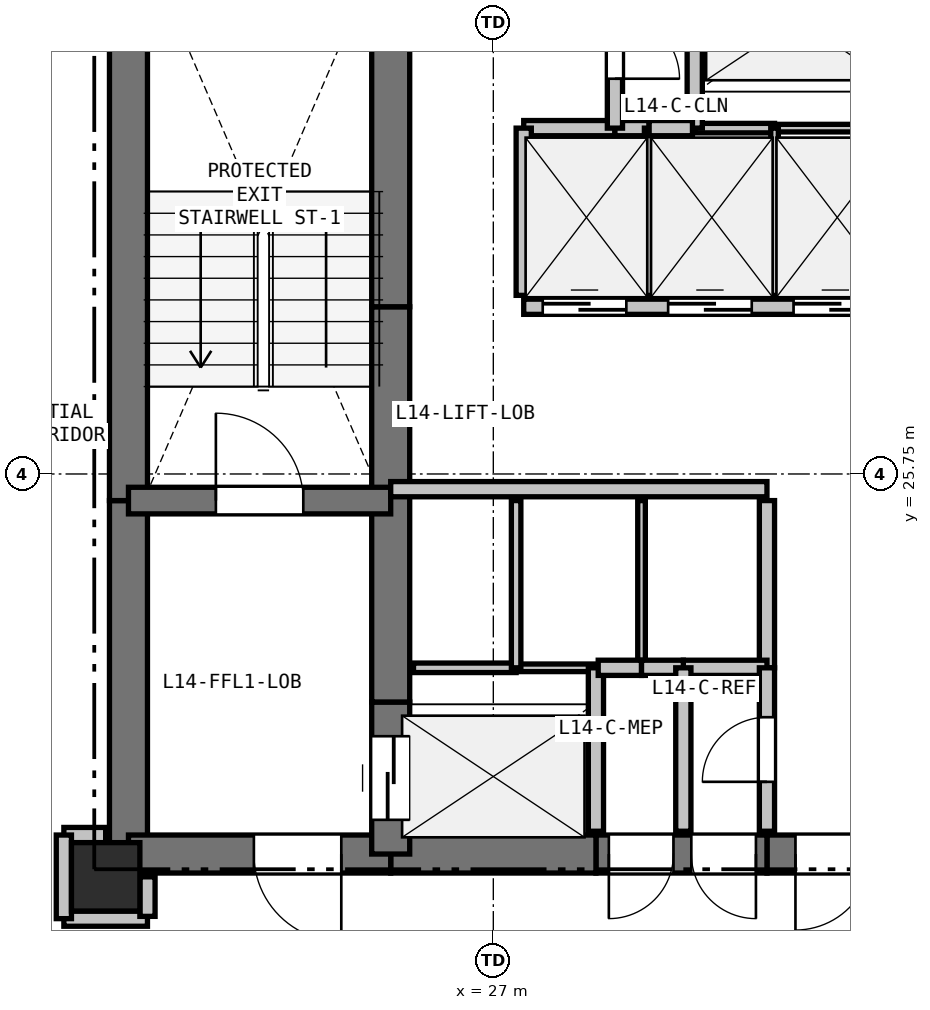
"""IFC4 building model, lengths in metres.
Left out: names, types, materials, properties, quantities, classifications, styles, units other than length and angle.
Written with IfcOpenShell. Run it as: python <this file> out.ifc"""

import sys

from ifc_helpers import new_model, si_unit, direction, frame, frame_2d, origin, origin_2d, place, context, subcontext, project, spatial, rectangle, extrude, element, fill, save


model = new_model("IFC4")
c1 = context("Model", 3, precision=1e-05, world=origin(), true_north=direction((0.0, 1.0)))
c2 = subcontext(c1, "Body", "Model", "MODEL_VIEW")
j1 = project(units=[si_unit("LENGTHUNIT", "METRE"), si_unit("PLANEANGLEUNIT", "RADIAN")], contexts=[c1])
p1 = place(None, origin())
s1 = spatial("IfcSite", under=j1, at=p1, CompositionType="ELEMENT")
p2 = place(p1, origin())
s2 = spatial("IfcBuilding", under=s1, at=p2, CompositionType="ELEMENT")
p3 = place(p2, frame((0.0, 0.0, 52.2)))
s3 = spatial("IfcBuildingStorey", under=s2, at=p3, CompositionType="ELEMENT", Elevation=52.2)
p4 = place(p3, frame((21.9, 20.45, 0.0), z_axis=(0.0, 0.0, 1.0), x_axis=(1.0, 0.0, 0.0)))
e1 = element("IfcColumn", 1, at=p4, inside=s3, PredefinedType="COLUMN", context=c2, shape_type="SweptSolid", body=[
    extrude(rectangle(XDim=0.9, YDim=0.9, at=origin_2d()), origin(), (0.0, 0.0, 1.0), 3.3),
])
p5 = place(p3, frame((22.2, 20.75, 0.0), z_axis=(0.0, 0.0, 1.0), x_axis=(0.0, 1.0, 0.0)))
e2 = element("IfcWall", 2, at=p5, inside=s3, PredefinedType="SHEAR", context=c2, shape_type="SweptSolid", body=[
    extrude(rectangle(XDim=4.65, YDim=0.5, at=frame_2d((2.325, 0.0))), origin(), (0.0, 0.0, 1.0), 3.04),
])
p6 = place(p3, frame((22.2, 25.4, 0.0), z_axis=(0.0, 0.0, 1.0), x_axis=(0.0, 1.0, 0.0)))
e3 = element("IfcWall", 3, at=p6, inside=s3, PredefinedType="SHEAR", context=c2, shape_type="SweptSolid", body=[
    extrude(rectangle(XDim=7.35, YDim=0.5, at=frame_2d((3.675, 0.0))), origin(), (0.0, 0.0, 1.0), 3.04),
])
p7 = place(p3, frame((32.35, 20.75, 0.0), z_axis=(0.0, 0.0, 1.0), x_axis=(-1.0, 0.0, 0.0)))
e4 = element("IfcWall", 4, at=p7, inside=s3, PredefinedType="SHEAR", context=c2, shape_type="SweptSolid", body=[
    extrude(rectangle(XDim=1.75, YDim=0.5, at=frame_2d((0.875, 0.0))), origin(), (0.0, 0.0, 1.0), 3.04),
])
p8 = place(p7, frame((0.375, 0.0, 0.0)))
e5 = element("IfcOpeningElement", 5, at=p8, cuts=e4, PredefinedType="OPENING", context=c2, shape_type="SweptSolid", body=[
    extrude(rectangle(XDim=1.0, YDim=2.15, at=frame_2d((0.5, 1.075))), frame((0.0, 0.26, 0.0), z_axis=(0.0, -1.0, 0.0), x_axis=(1.0, 0.0, 0.0)), (0.0, 0.0, 1.0), 0.52),
])
p9 = place(p3, frame((30.6, 20.75, 0.0), z_axis=(0.0, 0.0, 1.0), x_axis=(-1.0, 0.0, 0.0)))
e6 = element("IfcWall", 6, at=p9, inside=s3, PredefinedType="SHEAR", context=c2, shape_type="SweptSolid", body=[
    extrude(rectangle(XDim=2.25, YDim=0.5, at=frame_2d((1.125, 0.0))), origin(), (0.0, 0.0, 1.0), 3.04),
])
p10 = place(p9, frame((1.23, 0.0, 0.0)))
e7 = element("IfcOpeningElement", 7, at=p10, cuts=e6, PredefinedType="OPENING", context=c2, shape_type="SweptSolid", body=[
    extrude(rectangle(XDim=0.85, YDim=2.1, at=frame_2d((0.425, 1.05))), frame((0.0, 0.26, 0.0), z_axis=(0.0, -1.0, 0.0), x_axis=(1.0, 0.0, 0.0)), (0.0, 0.0, 1.0), 0.52),
])
p11 = place(p9, frame((0.145, 0.0, 0.0)))
e8 = element("IfcOpeningElement", 8, at=p11, cuts=e6, PredefinedType="OPENING", context=c2, shape_type="SweptSolid", body=[
    extrude(rectangle(XDim=0.85, YDim=2.1, at=frame_2d((0.425, 1.05))), frame((0.0, 0.26, 0.0), z_axis=(0.0, -1.0, 0.0), x_axis=(1.0, 0.0, 0.0)), (0.0, 0.0, 1.0), 0.52),
])
p12 = place(p3, frame((28.35, 20.75, 0.0), z_axis=(0.0, 0.0, 1.0), x_axis=(-1.0, 0.0, 0.0)))
e9 = element("IfcWall", 9, at=p12, inside=s3, PredefinedType="SHEAR", context=c2, shape_type="SweptSolid", body=[
    extrude(rectangle(XDim=2.7, YDim=0.5, at=frame_2d((1.35, 0.0))), origin(), (0.0, 0.0, 1.0), 3.04),
])
p13 = place(p3, frame((25.65, 20.75, 0.0), z_axis=(0.0, 0.0, 1.0), x_axis=(-1.0, 0.0, 0.0)))
e10 = element("IfcWall", 10, at=p13, inside=s3, PredefinedType="SHEAR", context=c2, shape_type="SweptSolid", body=[
    extrude(rectangle(XDim=3.45, YDim=0.5, at=frame_2d((1.725, 0.0))), origin(), (0.0, 0.0, 1.0), 3.04),
])
p14 = place(p13, frame((0.65, 0.0, 0.0)))
e11 = element("IfcOpeningElement", 11, at=p14, cuts=e10, PredefinedType="OPENING", context=c2, shape_type="SweptSolid", body=[
    extrude(rectangle(XDim=1.15, YDim=2.15, at=frame_2d((0.575, 1.075))), frame((0.0, 0.26, 0.0), z_axis=(0.0, -1.0, 0.0), x_axis=(1.0, 0.0, 0.0)), (0.0, 0.0, 1.0), 0.52),
])
p15 = place(p3, frame((25.65, 20.75, 0.0), z_axis=(0.0, 0.0, 1.0), x_axis=(0.0, 1.0, 0.0)))
e12 = element("IfcWall", 12, at=p15, inside=s3, PredefinedType="SHEAR", context=c2, shape_type="SweptSolid", body=[
    extrude(rectangle(XDim=2.0, YDim=0.5, at=frame_2d((1.0, 0.0))), origin(), (0.0, 0.0, 1.0), 3.04),
])
p16 = place(p15, frame((0.45, 0.0, 0.0)))
e13 = element("IfcOpeningElement", 13, at=p16, cuts=e12, PredefinedType="OPENING", context=c2, shape_type="SweptSolid", body=[
    extrude(rectangle(XDim=1.1, YDim=2.15, at=frame_2d((0.55, 1.075))), frame((0.0, 0.26, 0.0), z_axis=(0.0, -1.0, 0.0), x_axis=(1.0, 0.0, 0.0)), (0.0, 0.0, 1.0), 0.52),
])
p17 = place(p3, frame((25.65, 22.75, 0.0), z_axis=(0.0, 0.0, 1.0), x_axis=(0.0, 1.0, 0.0)))
e14 = element("IfcWall", 14, at=p17, inside=s3, PredefinedType="SHEAR", context=c2, shape_type="SweptSolid", body=[
    extrude(rectangle(XDim=2.8, YDim=0.5, at=frame_2d((1.4, 0.0))), origin(), (0.0, 0.0, 1.0), 3.04),
])
p18 = place(p3, frame((25.65, 25.55, 0.0), z_axis=(0.0, 0.0, 1.0), x_axis=(0.0, 1.0, 0.0)))
e15 = element("IfcWall", 15, at=p18, inside=s3, PredefinedType="SHEAR", context=c2, shape_type="SweptSolid", body=[
    extrude(rectangle(XDim=2.4, YDim=0.5, at=frame_2d((1.2, 0.0))), origin(), (0.0, 0.0, 1.0), 3.04),
])
p19 = place(p3, frame((25.65, 27.95, 0.0), z_axis=(0.0, 0.0, 1.0), x_axis=(0.0, 1.0, 0.0)))
e16 = element("IfcWall", 16, at=p19, inside=s3, PredefinedType="SHEAR", context=c2, shape_type="SweptSolid", body=[
    extrude(rectangle(XDim=4.8, YDim=0.5, at=frame_2d((2.4, 0.0))), origin(), (0.0, 0.0, 1.0), 3.04),
])
p20 = place(p3, frame((22.2, 25.4, 0.0), z_axis=(0.0, 0.0, 1.0), x_axis=(1.0, 0.0, 0.0)))
e17 = element("IfcWall", 17, at=p20, inside=s3, PredefinedType="SHEAR", context=c2, shape_type="SweptSolid", body=[
    extrude(rectangle(XDim=3.45, YDim=0.35, at=frame_2d((1.725, 0.0))), origin(), (0.0, 0.0, 1.0), 3.04),
])
p21 = place(p20, frame((1.15, 0.0, 0.0)))
e18 = element("IfcOpeningElement", 18, at=p21, cuts=e17, PredefinedType="OPENING", context=c2, shape_type="SweptSolid", body=[
    extrude(rectangle(XDim=1.15, YDim=2.15, at=frame_2d((0.575, 1.075))), frame((0.0, 0.185, 0.0), z_axis=(0.0, -1.0, 0.0), x_axis=(1.0, 0.0, 0.0)), (0.0, 0.0, 1.0), 0.37),
])
p22 = place(p3, frame((25.65, 25.55, 0.0), z_axis=(0.0, 0.0, 1.0), x_axis=(1.0, 0.0, 0.0)))
e19 = element("IfcWall", 19, at=p22, inside=s3, PredefinedType="PARTITIONING", context=c2, shape_type="SweptSolid", body=[
    extrude(rectangle(XDim=4.95, YDim=0.2, at=frame_2d((2.475, 0.0))), origin(), (0.0, 0.0, 1.0), 3.04),
])
p23 = place(p3, frame((27.4, 27.95, 0.0), z_axis=(0.0, 0.0, 1.0), x_axis=(1.0, 0.0, 0.0)))
e20 = element("IfcWall", 20, at=p23, inside=s3, PredefinedType="PARTITIONING", context=c2, shape_type="SweptSolid", body=[
    extrude(rectangle(XDim=4.95, YDim=0.2, at=frame_2d((2.475, 0.0))), origin(), (0.0, 0.0, 1.0), 3.04),
])
p24 = place(p23, frame((0.25, 0.0, 0.0)))
e21 = element("IfcOpeningElement", 21, at=p24, cuts=e20, PredefinedType="OPENING", context=c2, shape_type="SweptSolid", body=[
    extrude(rectangle(XDim=1.1, YDim=2.15, at=frame_2d((0.55, 1.075))), frame((0.0, 0.11, 0.0), z_axis=(0.0, -1.0, 0.0), x_axis=(1.0, 0.0, 0.0)), (0.0, 0.0, 1.0), 0.22),
])
p25 = place(p23, frame((1.9, 0.0, 0.0)))
e22 = element("IfcOpeningElement", 22, at=p25, cuts=e20, PredefinedType="OPENING", context=c2, shape_type="SweptSolid", body=[
    extrude(rectangle(XDim=1.1, YDim=2.15, at=frame_2d((0.55, 1.075))), frame((0.0, 0.11, 0.0), z_axis=(0.0, -1.0, 0.0), x_axis=(1.0, 0.0, 0.0)), (0.0, 0.0, 1.0), 0.22),
])
p26 = place(p23, frame((3.55, 0.0, 0.0)))
e23 = element("IfcOpeningElement", 23, at=p26, cuts=e20, PredefinedType="OPENING", context=c2, shape_type="SweptSolid", body=[
    extrude(rectangle(XDim=1.1, YDim=2.15, at=frame_2d((0.55, 1.075))), frame((0.0, 0.11, 0.0), z_axis=(0.0, -1.0, 0.0), x_axis=(1.0, 0.0, 0.0)), (0.0, 0.0, 1.0), 0.22),
])
p27 = place(p3, frame((25.95, 23.2, 0.0), z_axis=(0.0, 0.0, 1.0), x_axis=(1.0, 0.0, 0.0)))
e24 = element("IfcWall", 24, at=p27, inside=s3, PredefinedType="PARTITIONING", context=c2, shape_type="SweptSolid", body=[
    extrude(rectangle(XDim=1.35, YDim=0.125, at=frame_2d((0.675, 0.0))), origin(), (0.0, 0.0, 1.0), 3.04),
])
p28 = place(p3, frame((27.3, 23.2, 0.0), z_axis=(0.0, 0.0, 1.0), x_axis=(1.0, 0.0, 0.0)))
e25 = element("IfcWall", 25, at=p28, inside=s3, PredefinedType="PARTITIONING", context=c2, shape_type="SweptSolid", body=[
    extrude(rectangle(XDim=1.05, YDim=0.1, at=frame_2d((0.525, 0.0))), origin(), (0.0, 0.0, 1.0), 3.04),
])
p29 = place(p3, frame((28.35, 23.2, 0.0), z_axis=(0.0, 0.0, 1.0), x_axis=(0.0, -1.0, 0.0)))
e26 = element("IfcWall", 26, at=p29, inside=s3, PredefinedType="PARTITIONING", context=c2, shape_type="SweptSolid", body=[
    extrude(rectangle(XDim=2.15, YDim=0.2, at=frame_2d((1.075, 0.0))), origin(), (0.0, 0.0, 1.0), 3.04),
])
p30 = place(p3, frame((32.05, 30.3, 0.0), z_axis=(0.0, 0.0, 1.0), x_axis=(-1.0, 0.0, 0.0)))
e27 = element("IfcWall", 27, at=p30, inside=s3, PredefinedType="PARTITIONING", context=c2, shape_type="SweptSolid", body=[
    extrude(rectangle(XDim=1.35, YDim=0.1, at=frame_2d((0.675, 0.0))), origin(), (0.0, 0.0, 1.0), 3.04),
])
p31 = place(p3, frame((30.7, 30.3, 0.0), z_axis=(0.0, 0.0, 1.0), x_axis=(-1.0, 0.0, 0.0)))
e28 = element("IfcWall", 28, at=p31, inside=s3, PredefinedType="PARTITIONING", context=c2, shape_type="SweptSolid", body=[
    extrude(rectangle(XDim=1.05, YDim=0.125, at=frame_2d((0.525, 0.0))), origin(), (0.0, 0.0, 1.0), 3.04),
])
p32 = place(p3, frame((29.65, 30.3, 0.0), z_axis=(0.0, 0.0, 1.0), x_axis=(0.0, 1.0, 0.0)))
e29 = element("IfcWall", 29, at=p32, inside=s3, PredefinedType="PARTITIONING", context=c2, shape_type="SweptSolid", body=[
    extrude(rectangle(XDim=2.15, YDim=0.2, at=frame_2d((1.075, 0.0))), origin(), (0.0, 0.0, 1.0), 3.04),
])
p33 = place(p3, frame((27.3, 25.4, 0.0), z_axis=(0.0, 0.0, 1.0), x_axis=(0.0, -1.0, 0.0)))
e30 = element("IfcWall", 30, at=p33, inside=s3, PredefinedType="PARTITIONING", context=c2, shape_type="SweptSolid", body=[
    extrude(rectangle(XDim=2.2, YDim=0.125, at=frame_2d((1.1, 0.0))), origin(), (0.0, 0.0, 1.0), 3.04),
])
p34 = place(p3, frame((28.95, 25.4, 0.0), z_axis=(0.0, 0.0, 1.0), x_axis=(0.0, -1.0, 0.0)))
e31 = element("IfcWall", 31, at=p34, inside=s3, PredefinedType="PARTITIONING", context=c2, shape_type="SweptSolid", body=[
    extrude(rectangle(XDim=2.2, YDim=0.1, at=frame_2d((1.1, 0.0))), origin(), (0.0, 0.0, 1.0), 3.04),
])
p35 = place(p3, frame((28.95, 23.2, 0.0), z_axis=(0.0, 0.0, 1.0), x_axis=(-1.0, 0.0, 0.0)))
e32 = element("IfcWall", 32, at=p35, inside=s3, PredefinedType="PARTITIONING", context=c2, shape_type="SweptSolid", body=[
    extrude(rectangle(XDim=0.57, YDim=0.2, at=frame_2d((0.285, 0.0))), origin(), (0.0, 0.0, 1.0), 3.04),
])
p36 = place(p3, frame((30.6, 25.4, 0.0), z_axis=(0.0, 0.0, 1.0), x_axis=(0.0, -1.0, 0.0)))
e33 = element("IfcWall", 33, at=p36, inside=s3, PredefinedType="PARTITIONING", context=c2, shape_type="SweptSolid", body=[
    extrude(rectangle(XDim=2.2, YDim=0.2, at=frame_2d((1.1, 0.0))), origin(), (0.0, 0.0, 1.0), 3.04),
])
p37 = place(p3, frame((30.6, 23.2, 0.0), z_axis=(0.0, 0.0, 1.0), x_axis=(-1.0, 0.0, 0.0)))
e34 = element("IfcWall", 34, at=p37, inside=s3, PredefinedType="PARTITIONING", context=c2, shape_type="SweptSolid", body=[
    extrude(rectangle(XDim=1.1, YDim=0.2, at=frame_2d((0.55, 0.0))), origin(), (0.0, 0.0, 1.0), 3.04),
])
p38 = place(p3, frame((29.5, 23.2, 0.0), z_axis=(0.0, 0.0, 1.0), x_axis=(-1.0, 0.0, 0.0)))
e35 = element("IfcWall", 35, at=p38, inside=s3, PredefinedType="PARTITIONING", context=c2, shape_type="SweptSolid", body=[
    extrude(rectangle(XDim=0.55, YDim=0.2, at=frame_2d((0.275, 0.0))), origin(), (0.0, 0.0, 1.0), 3.04),
])
p39 = place(p3, frame((27.4, 30.3, 0.0), z_axis=(0.0, 0.0, 1.0), x_axis=(1.0, 0.0, 0.0)))
e36 = element("IfcWall", 36, at=p39, inside=s3, PredefinedType="PARTITIONING", context=c2, shape_type="SweptSolid", body=[
    extrude(rectangle(XDim=1.2, YDim=0.2, at=frame_2d((0.6, 0.0))), origin(), (0.0, 0.0, 1.0), 3.04),
])
p40 = place(p3, frame((28.6, 30.3, 0.0), z_axis=(0.0, 0.0, 1.0), x_axis=(1.0, 0.0, 0.0)))
e37 = element("IfcWall", 37, at=p40, inside=s3, PredefinedType="PARTITIONING", context=c2, shape_type="SweptSolid", body=[
    extrude(rectangle(XDim=0.45, YDim=0.2, at=frame_2d((0.225, 0.0))), origin(), (0.0, 0.0, 1.0), 3.04),
])
p41 = place(p3, frame((29.05, 30.3, 0.0), z_axis=(0.0, 0.0, 1.0), x_axis=(0.0, -1.0, 0.0)))
e38 = element("IfcWall", 38, at=p41, inside=s3, PredefinedType="PARTITIONING", context=c2, shape_type="SweptSolid", body=[
    extrude(rectangle(XDim=2.2, YDim=0.125, at=frame_2d((1.1, 0.0))), origin(), (0.0, 0.0, 1.0), 3.04),
])
p42 = place(p3, frame((27.4, 28.1, 0.0), z_axis=(0.0, 0.0, 1.0), x_axis=(0.0, 1.0, 0.0)))
e39 = element("IfcWall", 39, at=p42, inside=s3, PredefinedType="PARTITIONING", context=c2, shape_type="SweptSolid", body=[
    extrude(rectangle(XDim=2.2, YDim=0.2, at=frame_2d((1.1, 0.0))), origin(), (0.0, 0.0, 1.0), 3.04),
])
p43 = place(p3, frame((29.05, 30.3, 0.0), z_axis=(0.0, 0.0, 1.0), x_axis=(1.0, 0.0, 0.0)))
e40 = element("IfcWall", 40, at=p43, inside=s3, PredefinedType="PARTITIONING", context=c2, shape_type="SweptSolid", body=[
    extrude(rectangle(XDim=0.57, YDim=0.2, at=frame_2d((0.285, 0.0))), origin(), (0.0, 0.0, 1.0), 3.04),
])
p44 = place(p3, frame((30.7, 30.3, 0.0), z_axis=(0.0, 0.0, 1.0), x_axis=(0.0, -1.0, 0.0)))
e41 = element("IfcWall", 41, at=p44, inside=s3, PredefinedType="PARTITIONING", context=c2, shape_type="SweptSolid", body=[
    extrude(rectangle(XDim=2.2, YDim=0.1, at=frame_2d((1.1, 0.0))), origin(), (0.0, 0.0, 1.0), 3.04),
])
p45 = place(p3, frame((30.6, 21.05, 0.0), z_axis=(0.0, 0.0, 1.0), x_axis=(0.0, 1.0, 0.0)))
e42 = element("IfcWall", 42, at=p45, inside=s3, PredefinedType="PARTITIONING", context=c2, shape_type="SweptSolid", body=[
    extrude(rectangle(XDim=2.15, YDim=0.2, at=frame_2d((1.075, 0.0))), origin(), (0.0, 0.0, 1.0), 3.04),
])
p46 = place(p45, frame((0.65, 0.0, 0.0)))
e43 = element("IfcOpeningElement", 43, at=p46, cuts=e42, PredefinedType="OPENING", context=c2, shape_type="SweptSolid", body=[
    extrude(rectangle(XDim=0.85, YDim=2.1, at=frame_2d((0.425, 1.05))), frame((0.0, 0.11, 0.0), z_axis=(0.0, -1.0, 0.0), x_axis=(1.0, 0.0, 0.0)), (0.0, 0.0, 1.0), 0.22),
])
p47 = place(p3, frame((28.6, 32.45, 0.0), z_axis=(0.0, 0.0, 1.0), x_axis=(0.0, -1.0, 0.0)))
e44 = element("IfcWall", 44, at=p47, inside=s3, PredefinedType="PARTITIONING", context=c2, shape_type="SweptSolid", body=[
    extrude(rectangle(XDim=2.15, YDim=0.2, at=frame_2d((1.075, 0.0))), origin(), (0.0, 0.0, 1.0), 3.04),
])
p48 = place(p47, frame((0.65, 0.0, 0.0)))
e45 = element("IfcOpeningElement", 45, at=p48, cuts=e44, PredefinedType="OPENING", context=c2, shape_type="SweptSolid", body=[
    extrude(rectangle(XDim=0.85, YDim=2.1, at=frame_2d((0.425, 1.05))), frame((0.0, 0.11, 0.0), z_axis=(0.0, -1.0, 0.0), x_axis=(1.0, 0.0, 0.0)), (0.0, 0.0, 1.0), 0.22),
])
p49 = place(p3, frame((21.35, 19.9, 0.0), z_axis=(0.0, 0.0, 1.0), x_axis=(1.0, 0.0, 0.0)))
e46 = element("IfcWall", 46, at=p49, inside=s3, PredefinedType="PARTITIONING", context=c2, shape_type="SweptSolid", body=[
    extrude(rectangle(XDim=1.1, YDim=0.2, at=frame_2d((0.55, 0.0))), origin(), (0.0, 0.0, 1.0), 2.338),
])
p50 = place(p3, frame((22.45, 19.93, 0.0), z_axis=(0.0, 0.0, 1.0), x_axis=(0.0, 1.0, 0.0)))
e47 = element("IfcWall", 47, at=p50, inside=s3, PredefinedType="PARTITIONING", context=c2, shape_type="SweptSolid", body=[
    extrude(rectangle(XDim=0.52, YDim=0.2, at=frame_2d((0.26, 0.0))), origin(), (0.0, 0.0, 1.0), 2.338),
])
p51 = place(p3, frame((21.9, 21.0, 0.0), z_axis=(0.0, 0.0, 1.0), x_axis=(-1.0, 0.0, 0.0)))
e48 = element("IfcWall", 48, at=p51, inside=s3, PredefinedType="PARTITIONING", context=c2, shape_type="SweptSolid", body=[
    extrude(rectangle(XDim=0.55, YDim=0.2, at=frame_2d((0.275, 0.0))), origin(), (0.0, 0.0, 1.0), 2.488),
])
p52 = place(p3, frame((21.35, 21.0, 0.0), z_axis=(0.0, 0.0, 1.0), x_axis=(0.0, -1.0, 0.0)))
e49 = element("IfcWall", 49, at=p52, inside=s3, PredefinedType="PARTITIONING", context=c2, shape_type="SweptSolid", body=[
    extrude(rectangle(XDim=1.1, YDim=0.2, at=frame_2d((0.55, 0.0))), origin(), (0.0, 0.0, 1.0), 2.338),
])
p53 = place(p3, frame((29.5, 23.2, 0.0), z_axis=(0.0, 0.0, 1.0), x_axis=(0.0, -1.0, 0.0)))
e50 = element("IfcWall", 50, at=p53, inside=s3, PredefinedType="PARTITIONING", context=c2, shape_type="SweptSolid", body=[
    extrude(rectangle(XDim=2.15, YDim=0.2, at=frame_2d((1.075, 0.0))), origin(), (0.0, 0.0, 1.0), 3.04),
])
p54 = place(p24, origin())
e51 = element("IfcDoor", 51, at=p54, inside=s3, OperationType="SLIDING_TO_LEFT", PredefinedType="DOOR", context=c2, shape_type="SweptSolid", body=[
    extrude(rectangle(XDim=1.1, YDim=2.15, at=frame_2d((0.55, 1.075))), frame((0.0, 0.025, 0.0), z_axis=(0.0, -1.0, 0.0), x_axis=(1.0, 0.0, 0.0)), (0.0, 0.0, 1.0), 0.05),
])
fill(e21, e51)
p55 = place(p25, origin())
e52 = element("IfcDoor", 52, at=p55, inside=s3, OperationType="SLIDING_TO_LEFT", PredefinedType="DOOR", context=c2, shape_type="SweptSolid", body=[
    extrude(rectangle(XDim=1.1, YDim=2.15, at=frame_2d((0.55, 1.075))), frame((0.0, 0.025, 0.0), z_axis=(0.0, -1.0, 0.0), x_axis=(1.0, 0.0, 0.0)), (0.0, 0.0, 1.0), 0.05),
])
fill(e22, e52)
p56 = place(p26, origin())
e53 = element("IfcDoor", 53, at=p56, inside=s3, OperationType="SLIDING_TO_LEFT", PredefinedType="DOOR", context=c2, shape_type="SweptSolid", body=[
    extrude(rectangle(XDim=1.1, YDim=2.15, at=frame_2d((0.55, 1.075))), frame((0.0, 0.025, 0.0), z_axis=(0.0, -1.0, 0.0), x_axis=(1.0, 0.0, 0.0)), (0.0, 0.0, 1.0), 0.05),
])
fill(e23, e53)
p57 = place(p8, origin())
e54 = element("IfcDoor", 54, at=p57, inside=s3, OperationType="SINGLE_SWING_RIGHT", PredefinedType="DOOR", context=c2, shape_type="SweptSolid", body=[
    extrude(rectangle(XDim=1.0, YDim=2.15, at=frame_2d((0.5, 1.075))), frame((0.0, 0.025, 0.0), z_axis=(0.0, -1.0, 0.0), x_axis=(1.0, 0.0, 0.0)), (0.0, 0.0, 1.0), 0.05),
])
fill(e5, e54)
p58 = place(p16, origin())
e55 = element("IfcDoor", 55, at=p58, inside=s3, OperationType="SLIDING_TO_LEFT", PredefinedType="DOOR", context=c2, shape_type="SweptSolid", body=[
    extrude(rectangle(XDim=1.1, YDim=2.15, at=frame_2d((0.55, 1.075))), frame((0.0, 0.025, 0.0), z_axis=(0.0, -1.0, 0.0), x_axis=(1.0, 0.0, 0.0)), (0.0, 0.0, 1.0), 0.05),
])
fill(e13, e55)
p59 = place(p21, origin())
e56 = element("IfcDoor", 56, at=p59, inside=s3, OperationType="SINGLE_SWING_LEFT", PredefinedType="DOOR", context=c2, shape_type="SweptSolid", body=[
    extrude(rectangle(XDim=1.15, YDim=2.15, at=frame_2d((0.575, 1.075))), frame((0.0, 0.025, 0.0), z_axis=(0.0, -1.0, 0.0), x_axis=(1.0, 0.0, 0.0)), (0.0, 0.0, 1.0), 0.05),
])
fill(e18, e56)
p60 = place(p14, origin())
e57 = element("IfcDoor", 57, at=p60, inside=s3, OperationType="SINGLE_SWING_LEFT", PredefinedType="DOOR", context=c2, shape_type="SweptSolid", body=[
    extrude(rectangle(XDim=1.15, YDim=2.15, at=frame_2d((0.575, 1.075))), frame((0.0, 0.025, 0.0), z_axis=(0.0, -1.0, 0.0), x_axis=(1.0, 0.0, 0.0)), (0.0, 0.0, 1.0), 0.05),
])
fill(e11, e57)
p61 = place(p46, origin())
e58 = element("IfcDoor", 58, at=p61, inside=s3, OperationType="SINGLE_SWING_LEFT", PredefinedType="DOOR", context=c2, shape_type="SweptSolid", body=[
    extrude(rectangle(XDim=0.85, YDim=2.1, at=frame_2d((0.425, 1.05))), frame((0.0, 0.025, 0.0), z_axis=(0.0, -1.0, 0.0), x_axis=(1.0, 0.0, 0.0)), (0.0, 0.0, 1.0), 0.05),
])
fill(e43, e58)
p62 = place(p48, origin())
e59 = element("IfcDoor", 59, at=p62, inside=s3, OperationType="SINGLE_SWING_RIGHT", PredefinedType="DOOR", context=c2, shape_type="SweptSolid", body=[
    extrude(rectangle(XDim=0.85, YDim=2.1, at=frame_2d((0.425, 1.05))), frame((0.0, 0.025, 0.0), z_axis=(0.0, -1.0, 0.0), x_axis=(1.0, 0.0, 0.0)), (0.0, 0.0, 1.0), 0.05),
])
fill(e45, e59)
p63 = place(p10, origin())
e60 = element("IfcDoor", 60, at=p63, inside=s3, OperationType="SINGLE_SWING_RIGHT", PredefinedType="DOOR", context=c2, shape_type="SweptSolid", body=[
    extrude(rectangle(XDim=0.85, YDim=2.1, at=frame_2d((0.425, 1.05))), frame((0.0, 0.025, 0.0), z_axis=(0.0, -1.0, 0.0), x_axis=(1.0, 0.0, 0.0)), (0.0, 0.0, 1.0), 0.05),
])
fill(e7, e60)
p64 = place(p11, origin())
e61 = element("IfcDoor", 61, at=p64, inside=s3, OperationType="SINGLE_SWING_LEFT", PredefinedType="DOOR", context=c2, shape_type="SweptSolid", body=[
    extrude(rectangle(XDim=0.85, YDim=2.1, at=frame_2d((0.425, 1.05))), frame((0.0, 0.025, 0.0), z_axis=(0.0, -1.0, 0.0), x_axis=(1.0, 0.0, 0.0)), (0.0, 0.0, 1.0), 0.05),
])
fill(e8, e61)
save(model, sys.argv[1])
